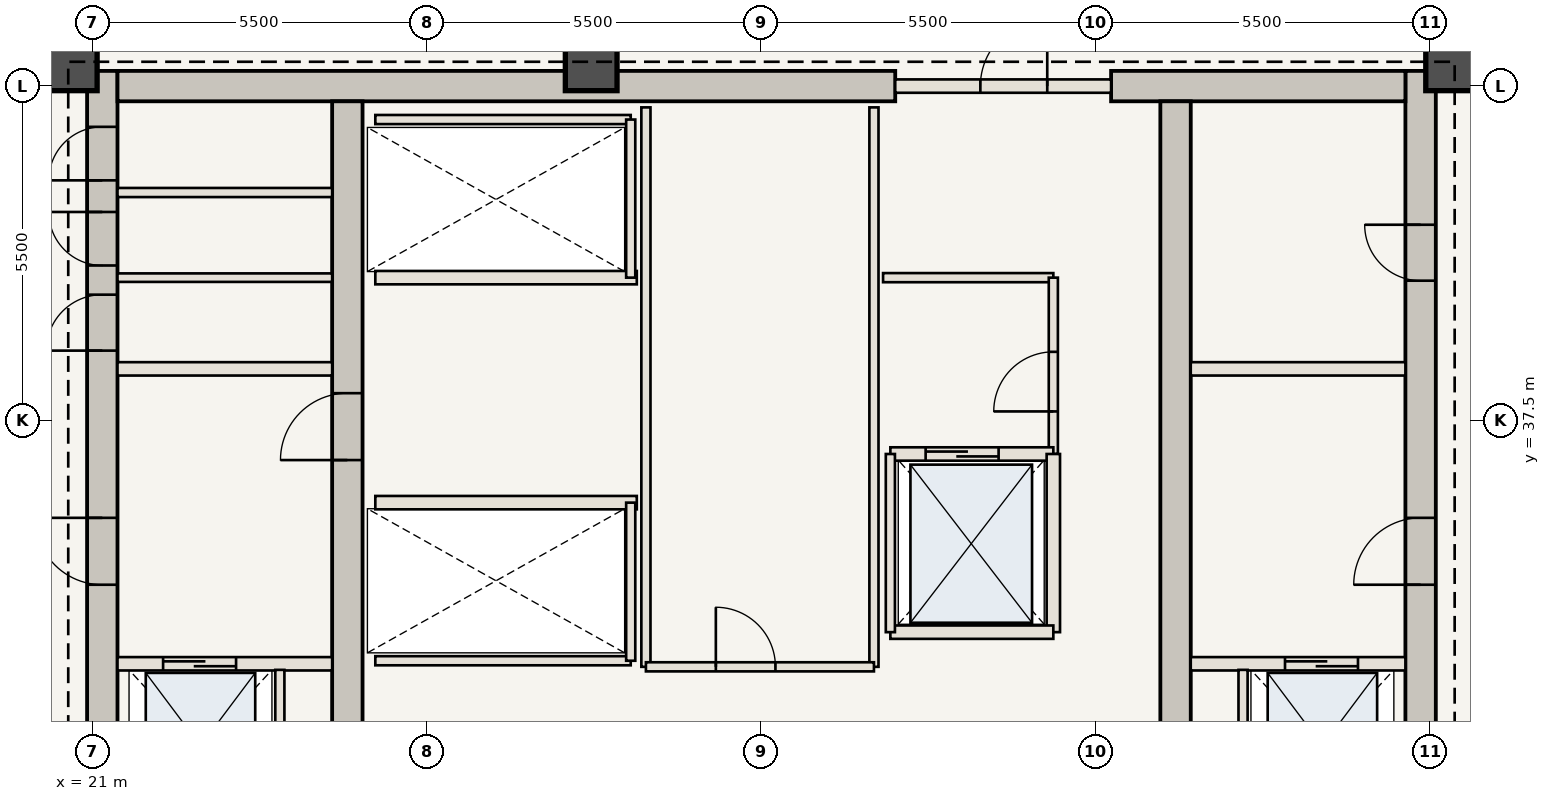
"""IFC4 building model, lengths in metres.
Left out: names, types, materials, properties, quantities, classifications, styles, units other than length and angle.
Written with IfcOpenShell. Run it as: python <this file> out.ifc"""

import sys

from ifc_helpers import new_model, si_unit, direction, frame, frame_2d, origin, origin_2d, place, context, subcontext, project, spatial, rectangle, extrude, element, fill, save


model = new_model("IFC4")
c1 = context("Model", 3, precision=1e-05, world=origin(), true_north=direction((0.0, 1.0)))
c2 = subcontext(c1, "Body", "Model", "MODEL_VIEW")
j1 = project(units=[si_unit("LENGTHUNIT", "METRE"), si_unit("PLANEANGLEUNIT", "RADIAN")], contexts=[c1])
p1 = place(None, origin())
s1 = spatial("IfcSite", under=j1, at=p1, CompositionType="ELEMENT")
p2 = place(p1, origin())
s2 = spatial("IfcBuilding", under=s1, at=p2, CompositionType="ELEMENT")
p3 = place(p2, frame((0.0, 0.0, 244.65)))
s3 = spatial("IfcBuildingStorey", under=s2, at=p3, CompositionType="ELEMENT", Elevation=244.65)
p4 = place(p3, frame((21.16, 30.6, 0.0), z_axis=(0.0, 0.0, 1.0), x_axis=(0.0, 1.0, 0.0)))
e1 = element("IfcWall", 1, at=p4, inside=s3, PredefinedType="SHEAR", context=c2, shape_type="SweptSolid", body=[
    extrude(rectangle(XDim=12.65, YDim=0.5, at=frame_2d((6.325, 0.0))), origin(), (0.0, 0.0, 1.0), 3.85),
])
p5 = place(p4, frame((4.2, 0.0, 0.0)))
e2 = element("IfcOpeningElement", 2, at=p5, cuts=e1, PredefinedType="OPENING", context=c2, shape_type="SweptSolid", body=[
    extrude(rectangle(XDim=1.1, YDim=2.15, at=frame_2d((0.55, 1.075))), frame((0.0, 0.26, 0.0), z_axis=(0.0, -1.0, 0.0), x_axis=(1.0, 0.0, 0.0)), (0.0, 0.0, 1.0), 0.52),
])
p6 = place(p4, frame((8.05, 0.0, 0.0)))
e3 = element("IfcOpeningElement", 3, at=p6, cuts=e1, PredefinedType="OPENING", context=c2, shape_type="SweptSolid", body=[
    extrude(rectangle(XDim=0.92, YDim=2.1, at=frame_2d((0.46, 1.05))), frame((0.0, 0.26, 0.0), z_axis=(0.0, -1.0, 0.0), x_axis=(1.0, 0.0, 0.0)), (0.0, 0.0, 1.0), 0.52),
])
p7 = place(p4, frame((9.45, 0.0, 0.0)))
e4 = element("IfcOpeningElement", 4, at=p7, cuts=e1, PredefinedType="OPENING", context=c2, shape_type="SweptSolid", body=[
    extrude(rectangle(XDim=0.88, YDim=2.1, at=frame_2d((0.44, 1.05))), frame((0.0, 0.26, 0.0), z_axis=(0.0, -1.0, 0.0), x_axis=(1.0, 0.0, 0.0)), (0.0, 0.0, 1.0), 0.52),
])
p8 = place(p4, frame((10.85, 0.0, 0.0)))
e5 = element("IfcOpeningElement", 5, at=p8, cuts=e1, PredefinedType="OPENING", context=c2, shape_type="SweptSolid", body=[
    extrude(rectangle(XDim=0.88, YDim=2.1, at=frame_2d((0.44, 1.05))), frame((0.0, 0.26, 0.0), z_axis=(0.0, -1.0, 0.0), x_axis=(1.0, 0.0, 0.0)), (0.0, 0.0, 1.0), 0.52),
])
p9 = place(p3, frame((42.84, 30.6, 0.0), z_axis=(0.0, 0.0, 1.0), x_axis=(0.0, 1.0, 0.0)))
e6 = element("IfcWall", 6, at=p9, inside=s3, PredefinedType="SHEAR", context=c2, shape_type="SweptSolid", body=[
    extrude(rectangle(XDim=12.65, YDim=0.5, at=frame_2d((6.325, 0.0))), origin(), (0.0, 0.0, 1.0), 3.85),
])
p10 = place(p9, frame((4.2, 0.0, 0.0)))
e7 = element("IfcOpeningElement", 7, at=p10, cuts=e6, PredefinedType="OPENING", context=c2, shape_type="SweptSolid", body=[
    extrude(rectangle(XDim=1.1, YDim=2.15, at=frame_2d((0.55, 1.075))), frame((0.0, 0.26, 0.0), z_axis=(0.0, -1.0, 0.0), x_axis=(1.0, 0.0, 0.0)), (0.0, 0.0, 1.0), 0.52),
])
p11 = place(p9, frame((9.2, 0.0, 0.0)))
e8 = element("IfcOpeningElement", 8, at=p11, cuts=e6, PredefinedType="OPENING", context=c2, shape_type="SweptSolid", body=[
    extrude(rectangle(XDim=0.92, YDim=2.1, at=frame_2d((0.46, 1.05))), frame((0.0, 0.26, 0.0), z_axis=(0.0, -1.0, 0.0), x_axis=(1.0, 0.0, 0.0)), (0.0, 0.0, 1.0), 0.52),
])
p12 = place(p3, frame((21.41, 43.0, 0.0), z_axis=(0.0, 0.0, 1.0), x_axis=(1.0, 0.0, 0.0)))
e9 = element("IfcWall", 9, at=p12, inside=s3, PredefinedType="SHEAR", context=c2, shape_type="SweptSolid", body=[
    extrude(rectangle(XDim=12.79, YDim=0.5, at=frame_2d((6.395, 0.0))), origin(), (0.0, 0.0, 1.0), 3.85),
])
p13 = place(p3, frame((37.75, 43.0, 0.0), z_axis=(0.0, 0.0, 1.0), x_axis=(1.0, 0.0, 0.0)))
e10 = element("IfcWall", 10, at=p13, inside=s3, PredefinedType="SHEAR", context=c2, shape_type="SweptSolid", body=[
    extrude(rectangle(XDim=4.84, YDim=0.5, at=frame_2d((2.42, 0.0))), origin(), (0.0, 0.0, 1.0), 3.85),
])
p14 = place(p3, frame((25.19, 30.6, 0.0), z_axis=(0.0, 0.0, 1.0), x_axis=(0.0, 1.0, 0.0)))
e11 = element("IfcWall", 11, at=p14, inside=s3, PredefinedType="SHEAR", context=c2, shape_type="SweptSolid", body=[
    extrude(rectangle(XDim=12.15, YDim=0.5, at=frame_2d((6.075, 0.0))), origin(), (0.0, 0.0, 1.0), 3.85),
])
p15 = place(p14, frame((6.25, 0.0, 0.0)))
e12 = element("IfcOpeningElement", 12, at=p15, cuts=e11, PredefinedType="OPENING", context=c2, shape_type="SweptSolid", body=[
    extrude(rectangle(XDim=1.1, YDim=2.15, at=frame_2d((0.55, 1.075))), frame((0.0, 0.26, 0.0), z_axis=(0.0, -1.0, 0.0), x_axis=(1.0, 0.0, 0.0)), (0.0, 0.0, 1.0), 0.52),
])
p16 = place(p3, frame((38.81, 30.6, 0.0), z_axis=(0.0, 0.0, 1.0), x_axis=(0.0, 1.0, 0.0)))
e13 = element("IfcWall", 13, at=p16, inside=s3, PredefinedType="SHEAR", context=c2, shape_type="SweptSolid", body=[
    extrude(rectangle(XDim=12.15, YDim=0.5, at=frame_2d((6.075, 0.0))), origin(), (0.0, 0.0, 1.0), 3.85),
])
for number, where, z_axis, x_axis in (
    (14, (43.35, 43.35, 0.0), (0.0, 0.0, 1.0), (1.0, 0.0, 0.0)),
    (15, (29.2, 43.35, 0.0), (0.0, 0.0, 1.0), (1.0, 0.0, 0.0)),
    (16, (20.65, 43.35, 0.0), (0.0, 0.0, 1.0), (1.0, 0.0, 0.0)),
):
    element("IfcColumn", number, at=place(p3, frame(where, z_axis=z_axis, x_axis=x_axis)), inside=s3, PredefinedType="COLUMN", context=c2, shape_type="SweptSolid", body=[
        extrude(rectangle(XDim=0.85, YDim=0.85, at=origin_2d()), origin(), (0.0, 0.0, 1.0), 3.85),
    ])
p17 = place(p3, frame((21.41, 33.5, 0.0), z_axis=(0.0, 0.0, 1.0), x_axis=(1.0, 0.0, 0.0)))
e17 = element("IfcWall", 17, at=p17, inside=s3, PredefinedType="STANDARD", context=c2, shape_type="SweptSolid", body=[
    extrude(rectangle(XDim=3.53, YDim=0.22, at=frame_2d((1.765, 0.0))), origin(), (0.0, 0.0, 1.0), 3.685),
])
p18 = place(p17, frame((0.75, 0.0, 0.0)))
e18 = element("IfcOpeningElement", 18, at=p18, cuts=e17, PredefinedType="OPENING", context=c2, shape_type="SweptSolid", body=[
    extrude(rectangle(XDim=1.2, YDim=2.2, at=frame_2d((0.6, 1.1))), frame((0.0, 0.12, 0.0), z_axis=(0.0, -1.0, 0.0), x_axis=(1.0, 0.0, 0.0)), (0.0, 0.0, 1.0), 0.24),
])
p19 = place(p3, frame((24.08, 30.75, 0.0), z_axis=(0.0, 0.0, 1.0), x_axis=(0.0, 1.0, 0.0)))
e19 = element("IfcWall", 19, at=p19, inside=s3, PredefinedType="STANDARD", context=c2, shape_type="SweptSolid", body=[
    extrude(rectangle(XDim=2.65, YDim=0.15, at=frame_2d((1.325, 0.0))), origin(), (0.0, 0.0, 1.0), 3.685),
])
p20 = place(p3, frame((39.06, 33.5, 0.0), z_axis=(0.0, 0.0, 1.0), x_axis=(1.0, 0.0, 0.0)))
e20 = element("IfcWall", 20, at=p20, inside=s3, PredefinedType="STANDARD", context=c2, shape_type="SweptSolid", body=[
    extrude(rectangle(XDim=3.53, YDim=0.22, at=frame_2d((1.765, 0.0))), origin(), (0.0, 0.0, 1.0), 3.685),
])
p21 = place(p20, frame((1.55, 0.0, 0.0)))
e21 = element("IfcOpeningElement", 21, at=p21, cuts=e20, PredefinedType="OPENING", context=c2, shape_type="SweptSolid", body=[
    extrude(rectangle(XDim=1.2, YDim=2.2, at=frame_2d((0.6, 1.1))), frame((0.0, 0.12, 0.0), z_axis=(0.0, -1.0, 0.0), x_axis=(1.0, 0.0, 0.0)), (0.0, 0.0, 1.0), 0.24),
])
p22 = place(p3, frame((39.92, 30.75, 0.0), z_axis=(0.0, 0.0, 1.0), x_axis=(0.0, 1.0, 0.0)))
e22 = element("IfcWall", 22, at=p22, inside=s3, PredefinedType="STANDARD", context=c2, shape_type="SweptSolid", body=[
    extrude(rectangle(XDim=2.65, YDim=0.15, at=frame_2d((1.325, 0.0))), origin(), (0.0, 0.0, 1.0), 3.685),
])
for number, where, z_axis, x_axis in (
    (23, (21.41, 38.35, 0.0), (0.0, 0.0, 1.0), (1.0, 0.0, 0.0)),
    (24, (39.06, 38.35, 0.0), (0.0, 0.0, 1.0), (1.0, 0.0, 0.0)),
):
    element("IfcWall", number, at=place(p3, frame(where, z_axis=z_axis, x_axis=x_axis)), inside=s3, PredefinedType="STANDARD", context=c2, shape_type="SweptSolid", body=[
        extrude(rectangle(XDim=3.53, YDim=0.22, at=frame_2d((1.765, 0.0))), origin(), (0.0, 0.0, 1.0), 3.685),
    ])
p23 = place(p3, frame((21.41, 39.85, 0.0), z_axis=(0.0, 0.0, 1.0), x_axis=(1.0, 0.0, 0.0)))
e25 = element("IfcWall", 25, at=p23, inside=s3, PredefinedType="STANDARD", context=c2, shape_type="SweptSolid", body=[
    extrude(rectangle(XDim=3.53, YDim=0.14, at=frame_2d((1.765, 0.0))), origin(), (0.0, 0.0, 1.0), 3.685),
])
p24 = place(p3, frame((21.41, 41.25, 0.0), z_axis=(0.0, 0.0, 1.0), x_axis=(1.0, 0.0, 0.0)))
e26 = element("IfcWall", 26, at=p24, inside=s3, PredefinedType="STANDARD", context=c2, shape_type="SweptSolid", body=[
    extrude(rectangle(XDim=3.53, YDim=0.15, at=frame_2d((1.765, 0.0))), origin(), (0.0, 0.0, 1.0), 3.685),
])
p25 = place(p3, frame((34.0, 39.85, 0.0), z_axis=(0.0, 0.0, 1.0), x_axis=(1.0, 0.0, 0.0)))
e27 = element("IfcWall", 27, at=p25, inside=s3, PredefinedType="STANDARD", context=c2, shape_type="SweptSolid", body=[
    extrude(rectangle(XDim=2.8, YDim=0.15, at=frame_2d((1.4, 0.0))), origin(), (0.0, 0.0, 1.0), 3.685),
])
p26 = place(p3, frame((36.8, 36.95, 0.0), z_axis=(0.0, 0.0, 1.0), x_axis=(0.0, 1.0, 0.0)))
e28 = element("IfcWall", 28, at=p26, inside=s3, PredefinedType="STANDARD", context=c2, shape_type="SweptSolid", body=[
    extrude(rectangle(XDim=2.9, YDim=0.15, at=frame_2d((1.45, 0.0))), origin(), (0.0, 0.0, 1.0), 3.685),
])
p27 = place(p26, frame((0.7, 0.0, 0.0)))
e29 = element("IfcOpeningElement", 29, at=p27, cuts=e28, PredefinedType="OPENING", context=c2, shape_type="SweptSolid", body=[
    extrude(rectangle(XDim=0.98, YDim=2.2, at=frame_2d((0.49, 1.1))), frame((0.0, 0.085, 0.0), z_axis=(0.0, -1.0, 0.0), x_axis=(1.0, 0.0, 0.0)), (0.0, 0.0, 1.0), 0.17),
])
p28 = place(p3, frame((25.65, 36.15, 0.0), z_axis=(0.0, 0.0, 1.0), x_axis=(1.0, 0.0, 0.0)))
e30 = element("IfcWall", 30, at=p28, inside=s3, PredefinedType="STANDARD", context=c2, shape_type="SweptSolid", body=[
    extrude(rectangle(XDim=4.3, YDim=0.22, at=frame_2d((2.15, 0.0))), origin(), (0.0, 0.0, 1.0), 3.685),
])
p29 = place(p3, frame((25.65, 33.55, 0.0), z_axis=(0.0, 0.0, 1.0), x_axis=(1.0, 0.0, 0.0)))
e31 = element("IfcWall", 31, at=p29, inside=s3, PredefinedType="STANDARD", context=c2, shape_type="SweptSolid", body=[
    extrude(rectangle(XDim=4.2, YDim=0.15, at=frame_2d((2.1, 0.0))), origin(), (0.0, 0.0, 1.0), 3.685),
])
p30 = place(p3, frame((29.85, 33.55, 0.0), z_axis=(0.0, 0.0, 1.0), x_axis=(0.0, 1.0, 0.0)))
e32 = element("IfcWall", 32, at=p30, inside=s3, PredefinedType="STANDARD", context=c2, shape_type="SweptSolid", body=[
    extrude(rectangle(XDim=2.6, YDim=0.15, at=frame_2d((1.3, 0.0))), origin(), (0.0, 0.0, 1.0), 3.685),
])
p31 = place(p3, frame((25.65, 39.85, 0.0), z_axis=(0.0, 0.0, 1.0), x_axis=(1.0, 0.0, 0.0)))
e33 = element("IfcWall", 33, at=p31, inside=s3, PredefinedType="STANDARD", context=c2, shape_type="SweptSolid", body=[
    extrude(rectangle(XDim=4.3, YDim=0.22, at=frame_2d((2.15, 0.0))), origin(), (0.0, 0.0, 1.0), 3.685),
])
p32 = place(p3, frame((25.65, 42.45, 0.0), z_axis=(0.0, 0.0, 1.0), x_axis=(1.0, 0.0, 0.0)))
e34 = element("IfcWall", 34, at=p32, inside=s3, PredefinedType="STANDARD", context=c2, shape_type="SweptSolid", body=[
    extrude(rectangle(XDim=4.2, YDim=0.15, at=frame_2d((2.1, 0.0))), origin(), (0.0, 0.0, 1.0), 3.685),
])
p33 = place(p3, frame((29.85, 39.85, 0.0), z_axis=(0.0, 0.0, 1.0), x_axis=(0.0, 1.0, 0.0)))
e35 = element("IfcWall", 35, at=p33, inside=s3, PredefinedType="STANDARD", context=c2, shape_type="SweptSolid", body=[
    extrude(rectangle(XDim=2.6, YDim=0.15, at=frame_2d((1.3, 0.0))), origin(), (0.0, 0.0, 1.0), 3.685),
])
for number, where, z_axis, x_axis in (
    (36, (30.1, 33.45, 0.0), (0.0, 0.0, 1.0), (0.0, 1.0, 0.0)),
    (37, (33.85, 33.45, 0.0), (0.0, 0.0, 1.0), (0.0, 1.0, 0.0)),
):
    element("IfcWall", number, at=place(p3, frame(where, z_axis=z_axis, x_axis=x_axis)), inside=s3, PredefinedType="STANDARD", context=c2, shape_type="SweptSolid", body=[
        extrude(rectangle(XDim=9.2, YDim=0.15, at=frame_2d((4.6, 0.0))), origin(), (0.0, 0.0, 1.0), 3.685),
    ])
p34 = place(p3, frame((30.1, 33.45, 0.0), z_axis=(0.0, 0.0, 1.0), x_axis=(1.0, 0.0, 0.0)))
e38 = element("IfcWall", 38, at=p34, inside=s3, PredefinedType="STANDARD", context=c2, shape_type="SweptSolid", body=[
    extrude(rectangle(XDim=3.75, YDim=0.15, at=frame_2d((1.875, 0.0))), origin(), (0.0, 0.0, 1.0), 3.685),
])
p35 = place(p34, frame((1.15, 0.0, 0.0)))
e39 = element("IfcOpeningElement", 39, at=p35, cuts=e38, PredefinedType="OPENING", context=c2, shape_type="SweptSolid", body=[
    extrude(rectangle(XDim=0.98, YDim=2.2, at=frame_2d((0.49, 1.1))), frame((0.0, 0.085, 0.0), z_axis=(0.0, -1.0, 0.0), x_axis=(1.0, 0.0, 0.0)), (0.0, 0.0, 1.0), 0.17),
])
p36 = place(p3, frame((34.2, 43.0, 0.0), z_axis=(0.0, 0.0, 1.0), x_axis=(1.0, 0.0, 0.0)))
e40 = element("IfcWall", 40, at=p36, inside=s3, PredefinedType="STANDARD", context=c2, shape_type="SweptSolid", body=[
    extrude(rectangle(XDim=3.55, YDim=0.22, at=frame_2d((1.775, 0.0))), origin(), (0.0, 0.0, 1.0), 3.685),
])
p37 = place(p36, frame((1.4, 0.0, 0.0)))
e41 = element("IfcOpeningElement", 41, at=p37, cuts=e40, PredefinedType="OPENING", context=c2, shape_type="SweptSolid", body=[
    extrude(rectangle(XDim=1.1, YDim=2.15, at=frame_2d((0.55, 1.075))), frame((0.0, 0.12, 0.0), z_axis=(0.0, -1.0, 0.0), x_axis=(1.0, 0.0, 0.0)), (0.0, 0.0, 1.0), 0.24),
])
p38 = place(p3, frame((34.12, 36.95, 0.0), z_axis=(0.0, 0.0, 1.0), x_axis=(1.0, 0.0, 0.0)))
e42 = element("IfcWall", 42, at=p38, inside=s3, PredefinedType="STANDARD", context=c2, shape_type="SweptSolid", body=[
    extrude(rectangle(XDim=2.68, YDim=0.22, at=frame_2d((1.34, 0.0))), origin(), (0.0, 0.0, 1.0), 3.685),
])
p39 = place(p38, frame((0.58, 0.0, 0.0)))
e43 = element("IfcOpeningElement", 43, at=p39, cuts=e42, PredefinedType="OPENING", context=c2, shape_type="SweptSolid", body=[
    extrude(rectangle(XDim=1.2, YDim=2.2, at=frame_2d((0.6, 1.1))), frame((0.0, 0.12, 0.0), z_axis=(0.0, -1.0, 0.0), x_axis=(1.0, 0.0, 0.0)), (0.0, 0.0, 1.0), 0.24),
])
p40 = place(p3, frame((36.8, 34.02, 0.0), z_axis=(0.0, 0.0, 1.0), x_axis=(0.0, 1.0, 0.0)))
e44 = element("IfcWall", 44, at=p40, inside=s3, PredefinedType="STANDARD", context=c2, shape_type="SweptSolid", body=[
    extrude(rectangle(XDim=2.93, YDim=0.22, at=frame_2d((1.465, 0.0))), origin(), (0.0, 0.0, 1.0), 3.685),
])
p41 = place(p3, frame((34.12, 34.02, 0.0), z_axis=(0.0, 0.0, 1.0), x_axis=(1.0, 0.0, 0.0)))
e45 = element("IfcWall", 45, at=p41, inside=s3, PredefinedType="STANDARD", context=c2, shape_type="SweptSolid", body=[
    extrude(rectangle(XDim=2.68, YDim=0.22, at=frame_2d((1.34, 0.0))), origin(), (0.0, 0.0, 1.0), 3.685),
])
p42 = place(p3, frame((34.12, 34.02, 0.0), z_axis=(0.0, 0.0, 1.0), x_axis=(0.0, 1.0, 0.0)))
e46 = element("IfcWall", 46, at=p42, inside=s3, PredefinedType="STANDARD", context=c2, shape_type="SweptSolid", body=[
    extrude(rectangle(XDim=2.93, YDim=0.15, at=frame_2d((1.465, 0.0))), origin(), (0.0, 0.0, 1.0), 3.685),
])
p43 = place(p5, origin())
e47 = element("IfcDoor", 47, at=p43, inside=s3, OperationType="SINGLE_SWING_RIGHT", PredefinedType="DOOR", context=c2, shape_type="SweptSolid", body=[
    extrude(rectangle(XDim=1.1, YDim=2.15, at=frame_2d((0.55, 1.075))), frame((0.0, 0.025, 0.0), z_axis=(0.0, -1.0, 0.0), x_axis=(1.0, 0.0, 0.0)), (0.0, 0.0, 1.0), 0.05),
])
fill(e2, e47)
p44 = place(p10, origin())
e48 = element("IfcDoor", 48, at=p44, inside=s3, OperationType="SINGLE_SWING_LEFT", PredefinedType="DOOR", context=c2, shape_type="SweptSolid", body=[
    extrude(rectangle(XDim=1.1, YDim=2.15, at=frame_2d((0.55, 1.075))), frame((0.0, 0.025, 0.0), z_axis=(0.0, -1.0, 0.0), x_axis=(1.0, 0.0, 0.0)), (0.0, 0.0, 1.0), 0.05),
])
fill(e7, e48)
p45 = place(p15, origin())
e49 = element("IfcDoor", 49, at=p45, inside=s3, OperationType="SINGLE_SWING_LEFT", PredefinedType="DOOR", context=c2, shape_type="SweptSolid", body=[
    extrude(rectangle(XDim=1.1, YDim=2.15, at=frame_2d((0.55, 1.075))), frame((0.0, 0.025, 0.0), z_axis=(0.0, -1.0, 0.0), x_axis=(1.0, 0.0, 0.0)), (0.0, 0.0, 1.0), 0.05),
])
fill(e12, e49)
p46 = place(p6, origin())
e50 = element("IfcDoor", 50, at=p46, inside=s3, OperationType="SINGLE_SWING_LEFT", PredefinedType="DOOR", context=c2, shape_type="SweptSolid", body=[
    extrude(rectangle(XDim=0.92, YDim=2.1, at=frame_2d((0.46, 1.05))), frame((0.0, 0.025, 0.0), z_axis=(0.0, -1.0, 0.0), x_axis=(1.0, 0.0, 0.0)), (0.0, 0.0, 1.0), 0.05),
])
fill(e3, e50)
p47 = place(p7, origin())
e51 = element("IfcDoor", 51, at=p47, inside=s3, OperationType="SINGLE_SWING_RIGHT", PredefinedType="DOOR", context=c2, shape_type="SweptSolid", body=[
    extrude(rectangle(XDim=0.88, YDim=2.1, at=frame_2d((0.44, 1.05))), frame((0.0, 0.025, 0.0), z_axis=(0.0, -1.0, 0.0), x_axis=(1.0, 0.0, 0.0)), (0.0, 0.0, 1.0), 0.05),
])
fill(e4, e51)
p48 = place(p8, origin())
e52 = element("IfcDoor", 52, at=p48, inside=s3, OperationType="SINGLE_SWING_LEFT", PredefinedType="DOOR", context=c2, shape_type="SweptSolid", body=[
    extrude(rectangle(XDim=0.88, YDim=2.1, at=frame_2d((0.44, 1.05))), frame((0.0, 0.025, 0.0), z_axis=(0.0, -1.0, 0.0), x_axis=(1.0, 0.0, 0.0)), (0.0, 0.0, 1.0), 0.05),
])
fill(e5, e52)
p49 = place(p11, origin())
e53 = element("IfcDoor", 53, at=p49, inside=s3, OperationType="SINGLE_SWING_RIGHT", PredefinedType="DOOR", context=c2, shape_type="SweptSolid", body=[
    extrude(rectangle(XDim=0.92, YDim=2.1, at=frame_2d((0.46, 1.05))), frame((0.0, 0.025, 0.0), z_axis=(0.0, -1.0, 0.0), x_axis=(1.0, 0.0, 0.0)), (0.0, 0.0, 1.0), 0.05),
])
fill(e8, e53)
p50 = place(p18, origin())
e54 = element("IfcDoor", 54, at=p50, inside=s3, OperationType="DOUBLE_DOOR_SLIDING", PredefinedType="DOOR", context=c2, shape_type="SweptSolid", body=[
    extrude(rectangle(XDim=1.2, YDim=2.2, at=frame_2d((0.6, 1.1))), frame((0.0, 0.025, 0.0), z_axis=(0.0, -1.0, 0.0), x_axis=(1.0, 0.0, 0.0)), (0.0, 0.0, 1.0), 0.05),
])
fill(e18, e54)
p51 = place(p21, origin())
e55 = element("IfcDoor", 55, at=p51, inside=s3, OperationType="DOUBLE_DOOR_SLIDING", PredefinedType="DOOR", context=c2, shape_type="SweptSolid", body=[
    extrude(rectangle(XDim=1.2, YDim=2.2, at=frame_2d((0.6, 1.1))), frame((0.0, 0.025, 0.0), z_axis=(0.0, -1.0, 0.0), x_axis=(1.0, 0.0, 0.0)), (0.0, 0.0, 1.0), 0.05),
])
fill(e21, e55)
p52 = place(p27, origin())
e56 = element("IfcDoor", 56, at=p52, inside=s3, OperationType="SINGLE_SWING_LEFT", PredefinedType="DOOR", context=c2, shape_type="SweptSolid", body=[
    extrude(rectangle(XDim=0.98, YDim=2.2, at=frame_2d((0.49, 1.1))), frame((0.0, 0.025, 0.0), z_axis=(0.0, -1.0, 0.0), x_axis=(1.0, 0.0, 0.0)), (0.0, 0.0, 1.0), 0.05),
])
fill(e29, e56)
p53 = place(p35, origin())
e57 = element("IfcDoor", 57, at=p53, inside=s3, OperationType="SINGLE_SWING_LEFT", PredefinedType="DOOR", context=c2, shape_type="SweptSolid", body=[
    extrude(rectangle(XDim=0.98, YDim=2.2, at=frame_2d((0.49, 1.1))), frame((0.0, 0.025, 0.0), z_axis=(0.0, -1.0, 0.0), x_axis=(1.0, 0.0, 0.0)), (0.0, 0.0, 1.0), 0.05),
])
fill(e39, e57)
p54 = place(p37, origin())
e58 = element("IfcDoor", 58, at=p54, inside=s3, OperationType="SINGLE_SWING_RIGHT", PredefinedType="DOOR", context=c2, shape_type="SweptSolid", body=[
    extrude(rectangle(XDim=1.1, YDim=2.15, at=frame_2d((0.55, 1.075))), frame((0.0, 0.025, 0.0), z_axis=(0.0, -1.0, 0.0), x_axis=(1.0, 0.0, 0.0)), (0.0, 0.0, 1.0), 0.05),
])
fill(e41, e58)
p55 = place(p39, origin())
e59 = element("IfcDoor", 59, at=p55, inside=s3, OperationType="DOUBLE_DOOR_SLIDING", PredefinedType="DOOR", context=c2, shape_type="SweptSolid", body=[
    extrude(rectangle(XDim=1.2, YDim=2.2, at=frame_2d((0.6, 1.1))), frame((0.0, 0.025, 0.0), z_axis=(0.0, -1.0, 0.0), x_axis=(1.0, 0.0, 0.0)), (0.0, 0.0, 1.0), 0.05),
])
fill(e43, e59)
save(model, sys.argv[1])
